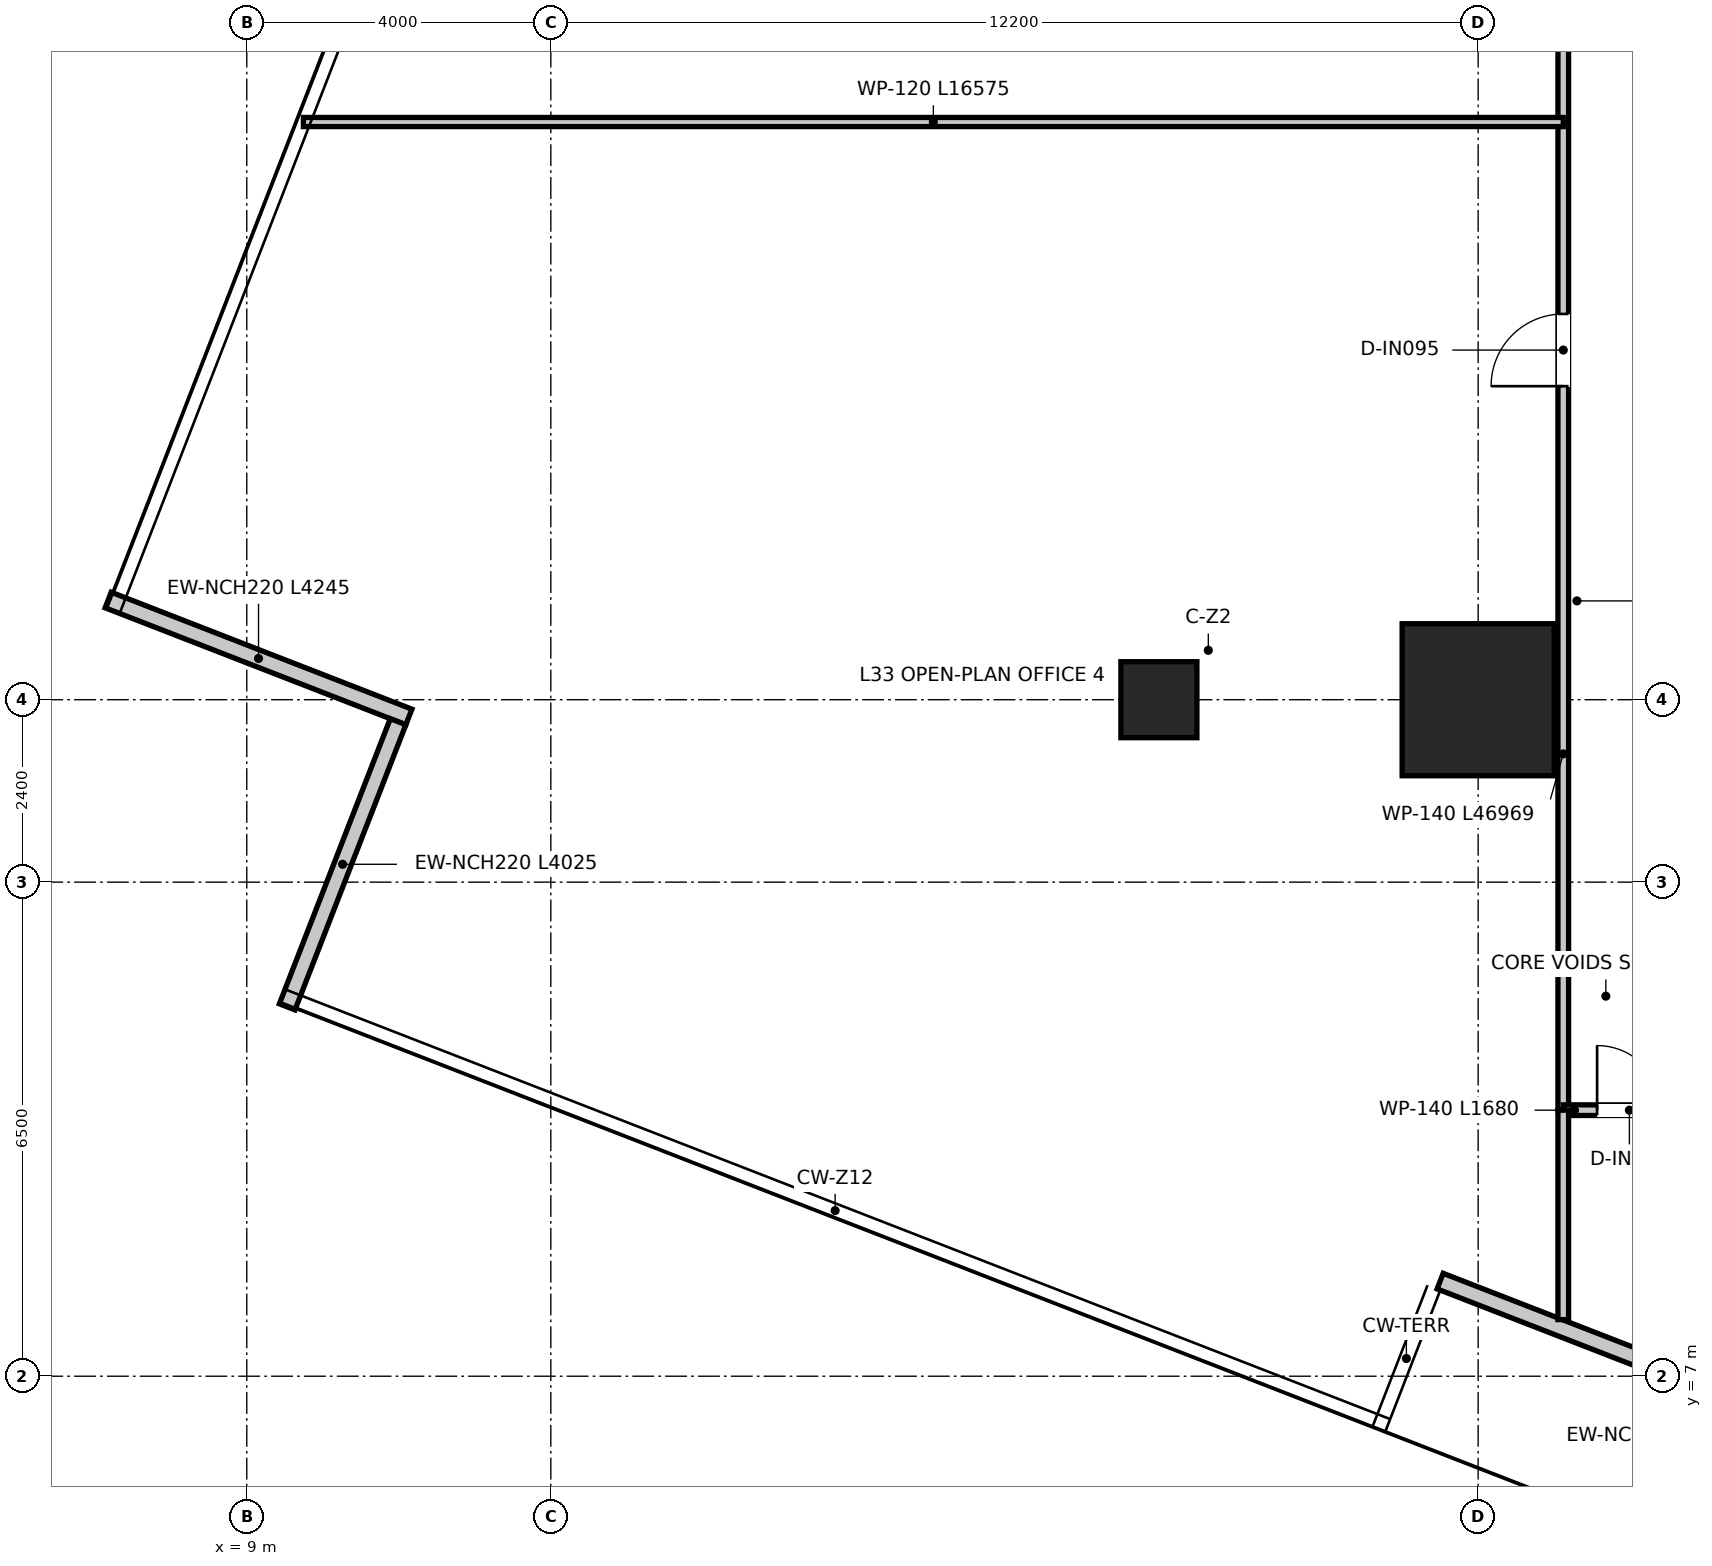
"""IFC4 building model, lengths in metres.
Left out: names, types, materials, properties, quantities, classifications, styles, units other than length and angle.
Written with IfcOpenShell. Run it as: python <this file> out.ifc"""

import sys

from ifc_helpers import new_model, si_unit, direction, frame, frame_2d, origin, origin_2d, place, context, subcontext, project, spatial, rectangle, extrude, source, transform, mapped, element, fill, save


model = new_model("IFC4")
c1 = context("Model", 3, precision=1e-05, world=origin(), true_north=direction((0.0, 1.0)))
c2 = subcontext(c1, "Body", "Model", "MODEL_VIEW")
j1 = project(units=[si_unit("LENGTHUNIT", "METRE"), si_unit("PLANEANGLEUNIT", "RADIAN")], contexts=[c1])
p1 = place(None, origin())
s1 = spatial("IfcSite", under=j1, at=p1, CompositionType="ELEMENT")
p2 = place(p1, origin())
s2 = spatial("IfcBuilding", under=s1, at=p2, CompositionType="ELEMENT")
p3 = place(p2, frame((0.0, 0.0, 137.45)))
s3 = spatial("IfcBuildingStorey", under=s2, at=p3, CompositionType="ELEMENT", Elevation=137.45)
m1 = source(origin(), c2, "Body", "SweptSolid", [
    extrude(rectangle(XDim=2.0, YDim=2.0, at=origin_2d()), origin(), (0.0, 0.0, 1.0), 3.95),
])
p4 = place(p3, frame((25.2, 15.9, 0.0), z_axis=(0.0, 0.0, 1.0), x_axis=(1.0, 0.0, 0.0)))
e1 = element("IfcColumn", 1, at=p4, inside=s3, PredefinedType="USERDEFINED", context=c2, shape_type="MappedRepresentation", body=[
    mapped(m1, transform((0.0, 0.0, 0.0), x_axis=(1.0, 0.0, 0.0), y_axis=(0.0, 1.0, 0.0), z_axis=(0.0, 0.0, 1.0), scale=1.0)),
])
m2 = source(origin(), c2, "Body", "SweptSolid", [
    extrude(rectangle(XDim=1.0, YDim=1.0, at=origin_2d()), origin(), (0.0, 0.0, 1.0), 3.95),
])
p5 = place(p3, frame((21.0, 15.9, 0.0), z_axis=(0.0, 0.0, 1.0), x_axis=(1.0, 0.0, 0.0)))
e2 = element("IfcColumn", 2, at=p5, inside=s3, PredefinedType="COLUMN", context=c2, shape_type="MappedRepresentation", body=[
    mapped(m2, transform((0.0, 0.0, 0.0), x_axis=(1.0, 0.0, 0.0), y_axis=(0.0, 1.0, 0.0), z_axis=(0.0, 0.0, 1.0), scale=1.0)),
])
p6 = place(p3, frame((7.176, 17.212, 0.0), z_axis=(0.0, 0.0, 1.0), x_axis=(0.932003592198, -0.362449036596, 0.0)))
e3 = element("IfcWall", 3, at=p6, inside=s3, PredefinedType="ELEMENTEDWALL", context=c2, shape_type="SweptSolid", body=[
    extrude(rectangle(XDim=4.245, YDim=0.22, at=frame_2d((2.123, 0.0))), origin(), (0.0, 0.0, 1.0), 3.6),
])
p7 = place(p3, frame((10.99, 15.611, 0.0), z_axis=(0.0, 0.0, 1.0), x_axis=(-0.362411136527, -0.932018330357, 0.0)))
e4 = element("IfcWall", 4, at=p7, inside=s3, PredefinedType="ELEMENTEDWALL", context=c2, shape_type="SweptSolid", body=[
    extrude(rectangle(XDim=4.025, YDim=0.22, at=frame_2d((2.013, 0.0))), origin(), (0.0, 0.0, 1.0), 3.6),
])
p8 = place(p3, frame((31.867, 5.464, 0.0), z_axis=(0.0, 0.0, 1.0), x_axis=(-0.931996329979, 0.362467710157, 0.0)))
e5 = element("IfcWall", 5, at=p8, inside=s3, PredefinedType="ELEMENTEDWALL", context=c2, shape_type="SweptSolid", body=[
    extrude(rectangle(XDim=7.69, YDim=0.22, at=frame_2d((3.845, 0.0))), origin(), (0.0, 0.0, 1.0), 3.6),
])
p9 = place(p8, frame((0.45, 0.0, 0.0)))
e6 = element("IfcOpeningElement", 6, at=p9, cuts=e5, PredefinedType="OPENING", context=c2, shape_type="SweptSolid", body=[
    extrude(rectangle(XDim=0.95, YDim=2.1, at=frame_2d((0.475, 1.05))), frame((0.0, 0.12, 0.0), z_axis=(0.0, -1.0, 0.0), x_axis=(1.0, 0.0, 0.0)), (0.0, 0.0, 1.0), 0.24),
])
p10 = place(p3, frame((26.32, 10.5, 0.0), z_axis=(0.0, 0.0, 1.0), x_axis=(0.0, 1.0, 0.0)))
e7 = element("IfcWall", 7, at=p10, inside=s3, PredefinedType="PARTITIONING", context=c2, shape_type="SweptSolid", body=[
    extrude(rectangle(XDim=25.62, YDim=0.14, at=frame_2d((12.81, 0.0))), origin(), (0.0, 0.0, 1.0), 2.9),
])
p11 = place(p10, frame((9.525, 0.0, 0.0)))
e8 = element("IfcOpeningElement", 8, at=p11, cuts=e7, PredefinedType="OPENING", context=c2, shape_type="SweptSolid", body=[
    extrude(rectangle(XDim=0.95, YDim=2.1, at=frame_2d((0.475, 1.05))), frame((0.0, 0.08, 0.0), z_axis=(0.0, -1.0, 0.0), x_axis=(1.0, 0.0, 0.0)), (0.0, 0.0, 1.0), 0.16),
])
p12 = place(p10, frame((16.525, 0.0, 0.0)))
e9 = element("IfcOpeningElement", 9, at=p12, cuts=e7, PredefinedType="OPENING", context=c2, shape_type="SweptSolid", body=[
    extrude(rectangle(XDim=0.95, YDim=2.1, at=frame_2d((0.475, 1.05))), frame((0.0, 0.08, 0.0), z_axis=(0.0, -1.0, 0.0), x_axis=(1.0, 0.0, 0.0)), (0.0, 0.0, 1.0), 0.16),
])
p13 = place(p10, frame((22.125, 0.0, 0.0)))
e10 = element("IfcOpeningElement", 10, at=p13, cuts=e7, PredefinedType="OPENING", context=c2, shape_type="SweptSolid", body=[
    extrude(rectangle(XDim=0.95, YDim=2.1, at=frame_2d((0.475, 1.05))), frame((0.0, 0.08, 0.0), z_axis=(0.0, -1.0, 0.0), x_axis=(1.0, 0.0, 0.0)), (0.0, 0.0, 1.0), 0.16),
])
p14 = place(p3, frame((26.32, 10.5, 0.0), z_axis=(0.0, 0.0, 1.0), x_axis=(1.0, 0.0, 0.0)))
e11 = element("IfcWall", 11, at=p14, inside=s3, PredefinedType="PARTITIONING", context=c2, shape_type="SweptSolid", body=[
    extrude(rectangle(XDim=1.68, YDim=0.14, at=frame_2d((0.84, 0.0))), origin(), (0.0, 0.0, 1.0), 3.6),
])
p15 = place(p14, frame((0.445, 0.0, 0.0)))
e12 = element("IfcOpeningElement", 12, at=p15, cuts=e11, PredefinedType="OPENING", context=c2, shape_type="SweptSolid", body=[
    extrude(rectangle(XDim=0.85, YDim=2.1, at=frame_2d((0.425, 1.05))), frame((0.0, 0.08, 0.0), z_axis=(0.0, -1.0, 0.0), x_axis=(1.0, 0.0, 0.0)), (0.0, 0.0, 1.0), 0.16),
])
p16 = place(p3, frame((26.32, 7.745, 0.0), z_axis=(0.0, 0.0, 1.0), x_axis=(0.0, 1.0, 0.0)))
e13 = element("IfcWall", 13, at=p16, inside=s3, PredefinedType="PARTITIONING", context=c2, shape_type="SweptSolid", body=[
    extrude(rectangle(XDim=2.755, YDim=0.14, at=frame_2d((1.378, 0.0))), origin(), (0.0, 0.0, 1.0), 3.6),
])
p17 = place(p3, frame((9.745, 23.5, 0.0), z_axis=(0.0, 0.0, 1.0), x_axis=(1.0, 0.0, 0.0)))
e14 = element("IfcWall", 14, at=p17, inside=s3, PredefinedType="PARTITIONING", context=c2, shape_type="SweptSolid", body=[
    extrude(rectangle(XDim=16.575, YDim=0.12, at=frame_2d((8.288, 0.0))), origin(), (0.0, 0.0, 1.0), 2.9),
])
p18 = place(p11, origin())
e15 = element("IfcDoor", 15, at=p18, inside=s3, OperationType="SINGLE_SWING_LEFT", PredefinedType="DOOR", context=c2, shape_type="SweptSolid", body=[
    extrude(rectangle(XDim=0.95, YDim=2.1, at=frame_2d((0.475, 1.05))), frame((0.0, 0.025, 0.0), z_axis=(0.0, -1.0, 0.0), x_axis=(1.0, 0.0, 0.0)), (0.0, 0.0, 1.0), 0.05),
])
fill(e8, e15)
p19 = place(p15, origin())
e16 = element("IfcDoor", 16, at=p19, inside=s3, OperationType="SINGLE_SWING_LEFT", PredefinedType="DOOR", context=c2, shape_type="SweptSolid", body=[
    extrude(rectangle(XDim=0.85, YDim=2.1, at=frame_2d((0.425, 1.05))), frame((0.0, 0.025, 0.0), z_axis=(0.0, -1.0, 0.0), x_axis=(1.0, 0.0, 0.0)), (0.0, 0.0, 1.0), 0.05),
])
fill(e12, e16)
save(model, sys.argv[1])
